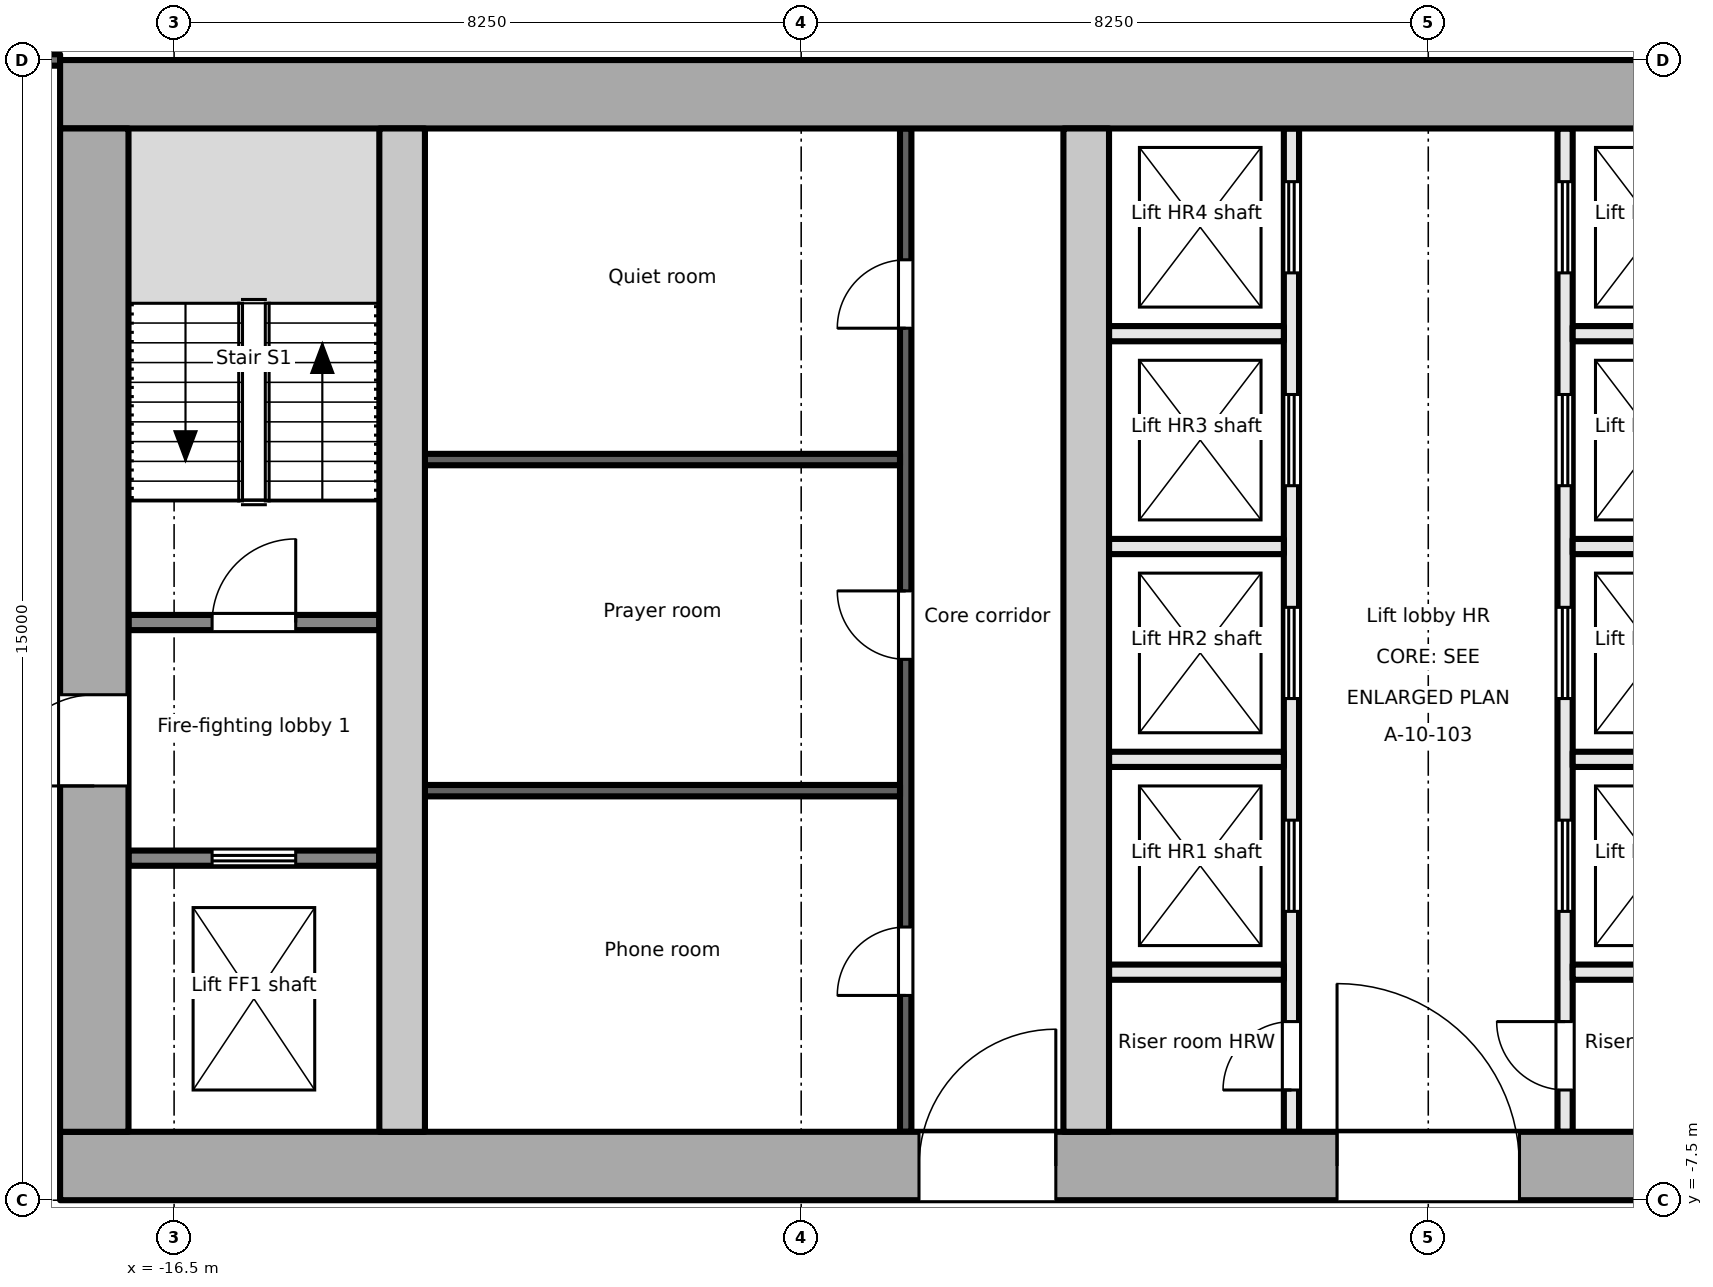
"""IFC4 building model, lengths in metres.
Left out: names, types, materials, properties, quantities, classifications, styles, units other than length and angle.
Written with IfcOpenShell. Run it as: python <this file> out.ifc"""

import sys

from ifc_helpers import new_model, si_unit, direction, frame, frame_2d, origin, place, context, subcontext, project, spatial, rectangle, extrude, element, fill, save


model = new_model("IFC4")
c1 = context("Model", 3, precision=1e-05, world=origin(), true_north=direction((0.0, 1.0)))
c2 = subcontext(c1, "Body", "Model", "MODEL_VIEW")
j1 = project(units=[si_unit("LENGTHUNIT", "METRE"), si_unit("PLANEANGLEUNIT", "RADIAN")], contexts=[c1])
p1 = place(None, origin())
s1 = spatial("IfcSite", under=j1, at=p1, CompositionType="ELEMENT")
p2 = place(p1, origin())
s2 = spatial("IfcBuilding", under=s1, at=p2, CompositionType="ELEMENT")
p3 = place(p2, frame((0.0, 0.0, 184.1)))
s3 = spatial("IfcBuildingStorey", under=s2, at=p3, CompositionType="ELEMENT", Elevation=184.1)
p4 = place(p3, frame((-18.0, -7.05, -0.2), z_axis=(0.0, 0.0, 1.0), x_axis=(1.0, 0.0, 0.0)))
e1 = element("IfcWall", 1, at=p4, inside=s3, PredefinedType="SHEAR", context=c2, shape_type="SweptSolid", body=[
    extrude(rectangle(XDim=36.0, YDim=0.9, at=frame_2d((18.0, 0.0))), origin(), (0.0, 0.0, 1.0), 3.9),
])
p5 = place(p4, frame((11.3, 0.0, 0.2)))
e2 = element("IfcOpeningElement", 2, at=p5, cuts=e1, PredefinedType="OPENING", context=c2, shape_type="SweptSolid", body=[
    extrude(rectangle(XDim=1.8, YDim=2.1, at=frame_2d((0.9, 1.05))), frame((0.0, 0.46, 0.0), z_axis=(0.0, -1.0, 0.0), x_axis=(1.0, 0.0, 0.0)), (0.0, 0.0, 1.0), 0.921),
])
p6 = place(p4, frame((16.8, 0.0, 0.2)))
e3 = element("IfcOpeningElement", 3, at=p6, cuts=e1, PredefinedType="OPENING", context=c2, shape_type="SweptSolid", body=[
    extrude(rectangle(XDim=2.4, YDim=2.1, at=frame_2d((1.2, 1.05))), frame((0.0, 0.46, 0.0), z_axis=(0.0, -1.0, 0.0), x_axis=(1.0, 0.0, 0.0)), (0.0, 0.0, 1.0), 0.921),
])
p7 = place(p4, frame((26.1, 0.0, 0.2)))
e4 = element("IfcOpeningElement", 4, at=p7, cuts=e1, PredefinedType="OPENING", context=c2, shape_type="SweptSolid", body=[
    extrude(rectangle(XDim=2.4, YDim=2.1, at=frame_2d((1.2, 1.05))), frame((0.0, 0.46, 0.0), z_axis=(0.0, -1.0, 0.0), x_axis=(1.0, 0.0, 0.0)), (0.0, 0.0, 1.0), 0.921),
])
p8 = place(p3, frame((-18.0, 7.05, -0.2), z_axis=(0.0, 0.0, 1.0), x_axis=(1.0, 0.0, 0.0)))
e5 = element("IfcWall", 5, at=p8, inside=s3, PredefinedType="SHEAR", context=c2, shape_type="SweptSolid", body=[
    extrude(rectangle(XDim=36.0, YDim=0.9, at=frame_2d((18.0, 0.0))), origin(), (0.0, 0.0, 1.0), 3.9),
])
p9 = place(p3, frame((-17.55, -6.6, -0.2), z_axis=(0.0, 0.0, 1.0), x_axis=(0.0, 1.0, 0.0)))
e6 = element("IfcWall", 6, at=p9, inside=s3, PredefinedType="SHEAR", context=c2, shape_type="SweptSolid", body=[
    extrude(rectangle(XDim=13.2, YDim=0.9, at=frame_2d((6.6, 0.0))), origin(), (0.0, 0.0, 1.0), 3.9),
])
p10 = place(p9, frame((4.55, 0.0, 0.2)))
e7 = element("IfcOpeningElement", 7, at=p10, cuts=e6, PredefinedType="OPENING", context=c2, shape_type="SweptSolid", body=[
    extrude(rectangle(XDim=1.2, YDim=2.1, at=frame_2d((0.6, 1.05))), frame((0.0, 0.46, 0.0), z_axis=(0.0, -1.0, 0.0), x_axis=(1.0, 0.0, 0.0)), (0.0, 0.0, 1.0), 0.921),
])
for number, where, z_axis, x_axis in (
    (8, (-13.5, -6.6, -0.2), (0.0, 0.0, 1.0), (0.0, 1.0, 0.0)),
    (9, (-4.5, -6.6, -0.2), (0.0, 0.0, 1.0), (0.0, 1.0, 0.0)),
):
    element("IfcWall", number, at=place(p3, frame(where, z_axis=z_axis, x_axis=x_axis)), inside=s3, PredefinedType="SHEAR", context=c2, shape_type="SweptSolid", body=[
        extrude(rectangle(XDim=13.2, YDim=0.6, at=frame_2d((6.6, 0.0))), origin(), (0.0, 0.0, 1.0), 3.9),
    ])
p11 = place(p3, frame((-17.1, -3.0, 0.0), z_axis=(0.0, 0.0, 1.0), x_axis=(1.0, 0.0, 0.0)))
e10 = element("IfcWall", 10, at=p11, inside=s3, PredefinedType="PARTITIONING", context=c2, shape_type="SweptSolid", body=[
    extrude(rectangle(XDim=3.3, YDim=0.2, at=frame_2d((1.65, 0.0))), origin(), (0.0, 0.0, 1.0), 3.7),
])
p12 = place(p11, frame((1.1, 0.0, 0.0)))
e11 = element("IfcOpeningElement", 11, at=p12, cuts=e10, PredefinedType="OPENING", context=c2, shape_type="SweptSolid", body=[
    extrude(rectangle(XDim=1.1, YDim=2.1, at=frame_2d((0.55, 1.05))), frame((0.0, 0.111, 0.0), z_axis=(0.0, -1.0, 0.0), x_axis=(1.0, 0.0, 0.0)), (0.0, 0.0, 1.0), 0.221),
])
p13 = place(p3, frame((-17.1, 0.1, 0.0), z_axis=(0.0, 0.0, 1.0), x_axis=(1.0, 0.0, 0.0)))
e12 = element("IfcWall", 12, at=p13, inside=s3, PredefinedType="PARTITIONING", context=c2, shape_type="SweptSolid", body=[
    extrude(rectangle(XDim=3.3, YDim=0.2, at=frame_2d((1.65, 0.0))), origin(), (0.0, 0.0, 1.0), 3.7),
])
p14 = place(p13, frame((1.1, 0.0, 0.0)))
e13 = element("IfcOpeningElement", 13, at=p14, cuts=e12, PredefinedType="OPENING", context=c2, shape_type="SweptSolid", body=[
    extrude(rectangle(XDim=1.1, YDim=2.1, at=frame_2d((0.55, 1.05))), frame((0.0, 0.111, 0.0), z_axis=(0.0, -1.0, 0.0), x_axis=(1.0, 0.0, 0.0)), (0.0, 0.0, 1.0), 0.221),
])
p15 = place(p3, frame((-6.875, -6.6, 0.0), z_axis=(0.0, 0.0, 1.0), x_axis=(0.0, 1.0, 0.0)))
e14 = element("IfcWall", 14, at=p15, inside=s3, PredefinedType="PARTITIONING", context=c2, shape_type="SweptSolid", body=[
    extrude(rectangle(XDim=13.2, YDim=0.15, at=frame_2d((6.6, 0.0))), origin(), (0.0, 0.0, 1.0), 3.7),
])
p16 = place(p15, frame((1.794, 0.0, 0.0)))
e15 = element("IfcOpeningElement", 15, at=p16, cuts=e14, PredefinedType="OPENING", context=c2, shape_type="SweptSolid", body=[
    extrude(rectangle(XDim=0.9, YDim=2.1, at=frame_2d((0.45, 1.05))), frame((0.0, 0.085, 0.0), z_axis=(0.0, -1.0, 0.0), x_axis=(1.0, 0.0, 0.0)), (0.0, 0.0, 1.0), 0.171),
])
p17 = place(p15, frame((6.216, 0.0, 0.0)))
e16 = element("IfcOpeningElement", 16, at=p17, cuts=e14, PredefinedType="OPENING", context=c2, shape_type="SweptSolid", body=[
    extrude(rectangle(XDim=0.9, YDim=2.1, at=frame_2d((0.45, 1.05))), frame((0.0, 0.085, 0.0), z_axis=(0.0, -1.0, 0.0), x_axis=(1.0, 0.0, 0.0)), (0.0, 0.0, 1.0), 0.171),
])
p18 = place(p15, frame((10.572, 0.0, 0.0)))
e17 = element("IfcOpeningElement", 17, at=p18, cuts=e14, PredefinedType="OPENING", context=c2, shape_type="SweptSolid", body=[
    extrude(rectangle(XDim=0.9, YDim=2.1, at=frame_2d((0.45, 1.05))), frame((0.0, 0.085, 0.0), z_axis=(0.0, -1.0, 0.0), x_axis=(1.0, 0.0, 0.0)), (0.0, 0.0, 1.0), 0.171),
])
for number, where, z_axis, x_axis in (
    (18, (-13.2, -2.112, 0.0), (0.0, 0.0, 1.0), (1.0, 0.0, 0.0)),
    (19, (-13.2, 2.244, 0.0), (0.0, 0.0, 1.0), (1.0, 0.0, 0.0)),
):
    element("IfcWall", number, at=place(p3, frame(where, z_axis=z_axis, x_axis=x_axis)), inside=s3, PredefinedType="PARTITIONING", context=c2, shape_type="SweptSolid", body=[
        extrude(rectangle(XDim=6.25, YDim=0.15, at=frame_2d((3.125, 0.0))), origin(), (0.0, 0.0, 1.0), 3.7),
    ])
p19 = place(p3, frame((-1.8, -6.6, 0.0), z_axis=(0.0, 0.0, 1.0), x_axis=(0.0, 1.0, 0.0)))
e20 = element("IfcWall", 20, at=p19, inside=s3, PredefinedType="PARTITIONING", context=c2, shape_type="SweptSolid", body=[
    extrude(rectangle(XDim=13.2, YDim=0.2, at=frame_2d((6.6, 0.0))), origin(), (0.0, 0.0, 1.0), 3.7),
])
p20 = place(p19, frame((0.55, 0.0, 0.0)))
e21 = element("IfcOpeningElement", 21, at=p20, cuts=e20, PredefinedType="OPENING", context=c2, shape_type="SweptSolid", body=[
    extrude(rectangle(XDim=0.9, YDim=2.1, at=frame_2d((0.45, 1.05))), frame((0.0, 0.111, 0.0), z_axis=(0.0, -1.0, 0.0), x_axis=(1.0, 0.0, 0.0)), (0.0, 0.0, 1.0), 0.221),
])
p21 = place(p19, frame((2.9, 0.0, 0.0)))
e22 = element("IfcOpeningElement", 22, at=p21, cuts=e20, PredefinedType="OPENING", context=c2, shape_type="SweptSolid", body=[
    extrude(rectangle(XDim=1.2, YDim=2.1, at=frame_2d((0.6, 1.05))), frame((0.0, 0.111, 0.0), z_axis=(0.0, -1.0, 0.0), x_axis=(1.0, 0.0, 0.0)), (0.0, 0.0, 1.0), 0.221),
])
p22 = place(p19, frame((5.7, 0.0, 0.0)))
e23 = element("IfcOpeningElement", 23, at=p22, cuts=e20, PredefinedType="OPENING", context=c2, shape_type="SweptSolid", body=[
    extrude(rectangle(XDim=1.2, YDim=2.1, at=frame_2d((0.6, 1.05))), frame((0.0, 0.111, 0.0), z_axis=(0.0, -1.0, 0.0), x_axis=(1.0, 0.0, 0.0)), (0.0, 0.0, 1.0), 0.221),
])
p23 = place(p19, frame((8.5, 0.0, 0.0)))
e24 = element("IfcOpeningElement", 24, at=p23, cuts=e20, PredefinedType="OPENING", context=c2, shape_type="SweptSolid", body=[
    extrude(rectangle(XDim=1.2, YDim=2.1, at=frame_2d((0.6, 1.05))), frame((0.0, 0.111, 0.0), z_axis=(0.0, -1.0, 0.0), x_axis=(1.0, 0.0, 0.0)), (0.0, 0.0, 1.0), 0.221),
])
p24 = place(p19, frame((11.3, 0.0, 0.0)))
e25 = element("IfcOpeningElement", 25, at=p24, cuts=e20, PredefinedType="OPENING", context=c2, shape_type="SweptSolid", body=[
    extrude(rectangle(XDim=1.2, YDim=2.1, at=frame_2d((0.6, 1.05))), frame((0.0, 0.111, 0.0), z_axis=(0.0, -1.0, 0.0), x_axis=(1.0, 0.0, 0.0)), (0.0, 0.0, 1.0), 0.221),
])
p25 = place(p3, frame((1.8, -6.6, 0.0), z_axis=(0.0, 0.0, 1.0), x_axis=(0.0, 1.0, 0.0)))
e26 = element("IfcWall", 26, at=p25, inside=s3, PredefinedType="PARTITIONING", context=c2, shape_type="SweptSolid", body=[
    extrude(rectangle(XDim=13.2, YDim=0.2, at=frame_2d((6.6, 0.0))), origin(), (0.0, 0.0, 1.0), 3.7),
])
p26 = place(p25, frame((0.55, 0.0, 0.0)))
e27 = element("IfcOpeningElement", 27, at=p26, cuts=e26, PredefinedType="OPENING", context=c2, shape_type="SweptSolid", body=[
    extrude(rectangle(XDim=0.9, YDim=2.1, at=frame_2d((0.45, 1.05))), frame((0.0, 0.111, 0.0), z_axis=(0.0, -1.0, 0.0), x_axis=(1.0, 0.0, 0.0)), (0.0, 0.0, 1.0), 0.221),
])
p27 = place(p25, frame((2.9, 0.0, 0.0)))
e28 = element("IfcOpeningElement", 28, at=p27, cuts=e26, PredefinedType="OPENING", context=c2, shape_type="SweptSolid", body=[
    extrude(rectangle(XDim=1.2, YDim=2.1, at=frame_2d((0.6, 1.05))), frame((0.0, 0.111, 0.0), z_axis=(0.0, -1.0, 0.0), x_axis=(1.0, 0.0, 0.0)), (0.0, 0.0, 1.0), 0.221),
])
p28 = place(p25, frame((5.7, 0.0, 0.0)))
e29 = element("IfcOpeningElement", 29, at=p28, cuts=e26, PredefinedType="OPENING", context=c2, shape_type="SweptSolid", body=[
    extrude(rectangle(XDim=1.2, YDim=2.1, at=frame_2d((0.6, 1.05))), frame((0.0, 0.111, 0.0), z_axis=(0.0, -1.0, 0.0), x_axis=(1.0, 0.0, 0.0)), (0.0, 0.0, 1.0), 0.221),
])
p29 = place(p25, frame((8.5, 0.0, 0.0)))
e30 = element("IfcOpeningElement", 30, at=p29, cuts=e26, PredefinedType="OPENING", context=c2, shape_type="SweptSolid", body=[
    extrude(rectangle(XDim=1.2, YDim=2.1, at=frame_2d((0.6, 1.05))), frame((0.0, 0.111, 0.0), z_axis=(0.0, -1.0, 0.0), x_axis=(1.0, 0.0, 0.0)), (0.0, 0.0, 1.0), 0.221),
])
p30 = place(p25, frame((11.3, 0.0, 0.0)))
e31 = element("IfcOpeningElement", 31, at=p30, cuts=e26, PredefinedType="OPENING", context=c2, shape_type="SweptSolid", body=[
    extrude(rectangle(XDim=1.2, YDim=2.1, at=frame_2d((0.6, 1.05))), frame((0.0, 0.111, 0.0), z_axis=(0.0, -1.0, 0.0), x_axis=(1.0, 0.0, 0.0)), (0.0, 0.0, 1.0), 0.221),
])
for number, where, z_axis, x_axis in (
    (32, (-4.2, -1.7, 0.0), (0.0, 0.0, 1.0), (1.0, 0.0, 0.0)),
    (33, (-4.2, 1.1, 0.0), (0.0, 0.0, 1.0), (1.0, 0.0, 0.0)),
    (34, (-4.2, 3.9, 0.0), (0.0, 0.0, 1.0), (1.0, 0.0, 0.0)),
    (35, (-4.2, -4.5, 0.0), (0.0, 0.0, 1.0), (1.0, 0.0, 0.0)),
    (36, (1.9, -1.7, 0.0), (0.0, 0.0, 1.0), (1.0, 0.0, 0.0)),
    (37, (1.9, 1.1, 0.0), (0.0, 0.0, 1.0), (1.0, 0.0, 0.0)),
    (38, (1.9, 3.9, 0.0), (0.0, 0.0, 1.0), (1.0, 0.0, 0.0)),
    (39, (1.9, -4.5, 0.0), (0.0, 0.0, 1.0), (1.0, 0.0, 0.0)),
):
    element("IfcWall", number, at=place(p3, frame(where, z_axis=z_axis, x_axis=x_axis)), inside=s3, PredefinedType="PARTITIONING", context=c2, shape_type="SweptSolid", body=[
        extrude(rectangle(XDim=2.3, YDim=0.2, at=frame_2d((1.15, 0.0))), origin(), (0.0, 0.0, 1.0), 3.7),
    ])
p31 = place(p3, frame((-20.625, 7.501, 0.0), z_axis=(0.0, 0.0, 1.0), x_axis=(1.0, 0.0, 0.0)))
e40 = element("IfcWall", 40, at=p31, inside=s3, PredefinedType="PARTITIONING", context=c2, shape_type="SweptSolid", body=[
    extrude(rectangle(XDim=2.625, YDim=0.15, at=frame_2d((1.312, 0.0))), origin(), (0.0, 0.0, 1.0), 3.7),
])
p32 = place(p12, origin())
e41 = element("IfcDoor", 41, at=p32, inside=s3, OperationType="DOUBLE_DOOR_SLIDING", PredefinedType="DOOR", context=c2, shape_type="SweptSolid", body=[
    extrude(rectangle(XDim=1.1, YDim=2.1, at=frame_2d((0.55, 1.05))), frame((0.0, 0.025, 0.0), z_axis=(0.0, -1.0, 0.0), x_axis=(1.0, 0.0, 0.0)), (0.0, 0.0, 1.0), 0.05),
])
fill(e11, e41)
p33 = place(p10, origin())
e42 = element("IfcDoor", 42, at=p33, inside=s3, OperationType="SINGLE_SWING_LEFT", PredefinedType="DOOR", context=c2, shape_type="SweptSolid", body=[
    extrude(rectangle(XDim=1.2, YDim=2.1, at=frame_2d((0.6, 1.05))), frame((0.0, 0.025, 0.0), z_axis=(0.0, -1.0, 0.0), x_axis=(1.0, 0.0, 0.0)), (0.0, 0.0, 1.0), 0.05),
])
fill(e7, e42)
p34 = place(p14, origin())
e43 = element("IfcDoor", 43, at=p34, inside=s3, OperationType="SINGLE_SWING_RIGHT", PredefinedType="DOOR", context=c2, shape_type="SweptSolid", body=[
    extrude(rectangle(XDim=1.1, YDim=2.1, at=frame_2d((0.55, 1.05))), frame((0.0, 0.025, 0.0), z_axis=(0.0, -1.0, 0.0), x_axis=(1.0, 0.0, 0.0)), (0.0, 0.0, 1.0), 0.05),
])
fill(e13, e43)
p35 = place(p16, origin())
e44 = element("IfcDoor", 44, at=p35, inside=s3, OperationType="SINGLE_SWING_LEFT", PredefinedType="DOOR", context=c2, shape_type="SweptSolid", body=[
    extrude(rectangle(XDim=0.9, YDim=2.1, at=frame_2d((0.45, 1.05))), frame((0.0, 0.025, 0.0), z_axis=(0.0, -1.0, 0.0), x_axis=(1.0, 0.0, 0.0)), (0.0, 0.0, 1.0), 0.05),
])
fill(e15, e44)
p36 = place(p17, origin())
e45 = element("IfcDoor", 45, at=p36, inside=s3, OperationType="SINGLE_SWING_RIGHT", PredefinedType="DOOR", context=c2, shape_type="SweptSolid", body=[
    extrude(rectangle(XDim=0.9, YDim=2.1, at=frame_2d((0.45, 1.05))), frame((0.0, 0.025, 0.0), z_axis=(0.0, -1.0, 0.0), x_axis=(1.0, 0.0, 0.0)), (0.0, 0.0, 1.0), 0.05),
])
fill(e16, e45)
p37 = place(p18, origin())
e46 = element("IfcDoor", 46, at=p37, inside=s3, OperationType="SINGLE_SWING_LEFT", PredefinedType="DOOR", context=c2, shape_type="SweptSolid", body=[
    extrude(rectangle(XDim=0.9, YDim=2.1, at=frame_2d((0.45, 1.05))), frame((0.0, 0.025, 0.0), z_axis=(0.0, -1.0, 0.0), x_axis=(1.0, 0.0, 0.0)), (0.0, 0.0, 1.0), 0.05),
])
fill(e17, e46)
p38 = place(p5, origin())
e47 = element("IfcDoor", 47, at=p38, inside=s3, OperationType="SINGLE_SWING_RIGHT", PredefinedType="DOOR", context=c2, shape_type="SweptSolid", body=[
    extrude(rectangle(XDim=1.8, YDim=2.1, at=frame_2d((0.9, 1.05))), frame((0.0, 0.025, 0.0), z_axis=(0.0, -1.0, 0.0), x_axis=(1.0, 0.0, 0.0)), (0.0, 0.0, 1.0), 0.05),
])
fill(e2, e47)
p39 = place(p20, origin())
e48 = element("IfcDoor", 48, at=p39, inside=s3, OperationType="SINGLE_SWING_LEFT", PredefinedType="DOOR", context=c2, shape_type="SweptSolid", body=[
    extrude(rectangle(XDim=0.9, YDim=2.1, at=frame_2d((0.45, 1.05))), frame((0.0, 0.025, 0.0), z_axis=(0.0, -1.0, 0.0), x_axis=(1.0, 0.0, 0.0)), (0.0, 0.0, 1.0), 0.05),
])
fill(e21, e48)
p40 = place(p21, origin())
e49 = element("IfcDoor", 49, at=p40, inside=s3, OperationType="DOUBLE_DOOR_SLIDING", PredefinedType="DOOR", context=c2, shape_type="SweptSolid", body=[
    extrude(rectangle(XDim=1.2, YDim=2.1, at=frame_2d((0.6, 1.05))), frame((0.0, 0.025, 0.0), z_axis=(0.0, -1.0, 0.0), x_axis=(1.0, 0.0, 0.0)), (0.0, 0.0, 1.0), 0.05),
])
fill(e22, e49)
p41 = place(p22, origin())
e50 = element("IfcDoor", 50, at=p41, inside=s3, OperationType="DOUBLE_DOOR_SLIDING", PredefinedType="DOOR", context=c2, shape_type="SweptSolid", body=[
    extrude(rectangle(XDim=1.2, YDim=2.1, at=frame_2d((0.6, 1.05))), frame((0.0, 0.025, 0.0), z_axis=(0.0, -1.0, 0.0), x_axis=(1.0, 0.0, 0.0)), (0.0, 0.0, 1.0), 0.05),
])
fill(e23, e50)
p42 = place(p23, origin())
e51 = element("IfcDoor", 51, at=p42, inside=s3, OperationType="DOUBLE_DOOR_SLIDING", PredefinedType="DOOR", context=c2, shape_type="SweptSolid", body=[
    extrude(rectangle(XDim=1.2, YDim=2.1, at=frame_2d((0.6, 1.05))), frame((0.0, 0.025, 0.0), z_axis=(0.0, -1.0, 0.0), x_axis=(1.0, 0.0, 0.0)), (0.0, 0.0, 1.0), 0.05),
])
fill(e24, e51)
p43 = place(p24, origin())
e52 = element("IfcDoor", 52, at=p43, inside=s3, OperationType="DOUBLE_DOOR_SLIDING", PredefinedType="DOOR", context=c2, shape_type="SweptSolid", body=[
    extrude(rectangle(XDim=1.2, YDim=2.1, at=frame_2d((0.6, 1.05))), frame((0.0, 0.025, 0.0), z_axis=(0.0, -1.0, 0.0), x_axis=(1.0, 0.0, 0.0)), (0.0, 0.0, 1.0), 0.05),
])
fill(e25, e52)
p44 = place(p26, origin())
e53 = element("IfcDoor", 53, at=p44, inside=s3, OperationType="SINGLE_SWING_RIGHT", PredefinedType="DOOR", context=c2, shape_type="SweptSolid", body=[
    extrude(rectangle(XDim=0.9, YDim=2.1, at=frame_2d((0.45, 1.05))), frame((0.0, 0.025, 0.0), z_axis=(0.0, -1.0, 0.0), x_axis=(1.0, 0.0, 0.0)), (0.0, 0.0, 1.0), 0.05),
])
fill(e27, e53)
p45 = place(p27, origin())
e54 = element("IfcDoor", 54, at=p45, inside=s3, OperationType="DOUBLE_DOOR_SLIDING", PredefinedType="DOOR", context=c2, shape_type="SweptSolid", body=[
    extrude(rectangle(XDim=1.2, YDim=2.1, at=frame_2d((0.6, 1.05))), frame((0.0, 0.025, 0.0), z_axis=(0.0, -1.0, 0.0), x_axis=(1.0, 0.0, 0.0)), (0.0, 0.0, 1.0), 0.05),
])
fill(e28, e54)
p46 = place(p28, origin())
e55 = element("IfcDoor", 55, at=p46, inside=s3, OperationType="DOUBLE_DOOR_SLIDING", PredefinedType="DOOR", context=c2, shape_type="SweptSolid", body=[
    extrude(rectangle(XDim=1.2, YDim=2.1, at=frame_2d((0.6, 1.05))), frame((0.0, 0.025, 0.0), z_axis=(0.0, -1.0, 0.0), x_axis=(1.0, 0.0, 0.0)), (0.0, 0.0, 1.0), 0.05),
])
fill(e29, e55)
p47 = place(p29, origin())
e56 = element("IfcDoor", 56, at=p47, inside=s3, OperationType="DOUBLE_DOOR_SLIDING", PredefinedType="DOOR", context=c2, shape_type="SweptSolid", body=[
    extrude(rectangle(XDim=1.2, YDim=2.1, at=frame_2d((0.6, 1.05))), frame((0.0, 0.025, 0.0), z_axis=(0.0, -1.0, 0.0), x_axis=(1.0, 0.0, 0.0)), (0.0, 0.0, 1.0), 0.05),
])
fill(e30, e56)
p48 = place(p30, origin())
e57 = element("IfcDoor", 57, at=p48, inside=s3, OperationType="DOUBLE_DOOR_SLIDING", PredefinedType="DOOR", context=c2, shape_type="SweptSolid", body=[
    extrude(rectangle(XDim=1.2, YDim=2.1, at=frame_2d((0.6, 1.05))), frame((0.0, 0.025, 0.0), z_axis=(0.0, -1.0, 0.0), x_axis=(1.0, 0.0, 0.0)), (0.0, 0.0, 1.0), 0.05),
])
fill(e31, e57)
p49 = place(p6, origin())
e58 = element("IfcDoor", 58, at=p49, inside=s3, OperationType="DOUBLE_DOOR_DOUBLE_SWING", PredefinedType="DOOR", context=c2, shape_type="SweptSolid", body=[
    extrude(rectangle(XDim=2.4, YDim=2.1, at=frame_2d((1.2, 1.05))), frame((0.0, 0.025, 0.0), z_axis=(0.0, -1.0, 0.0), x_axis=(1.0, 0.0, 0.0)), (0.0, 0.0, 1.0), 0.05),
])
fill(e3, e58)
save(model, sys.argv[1])
